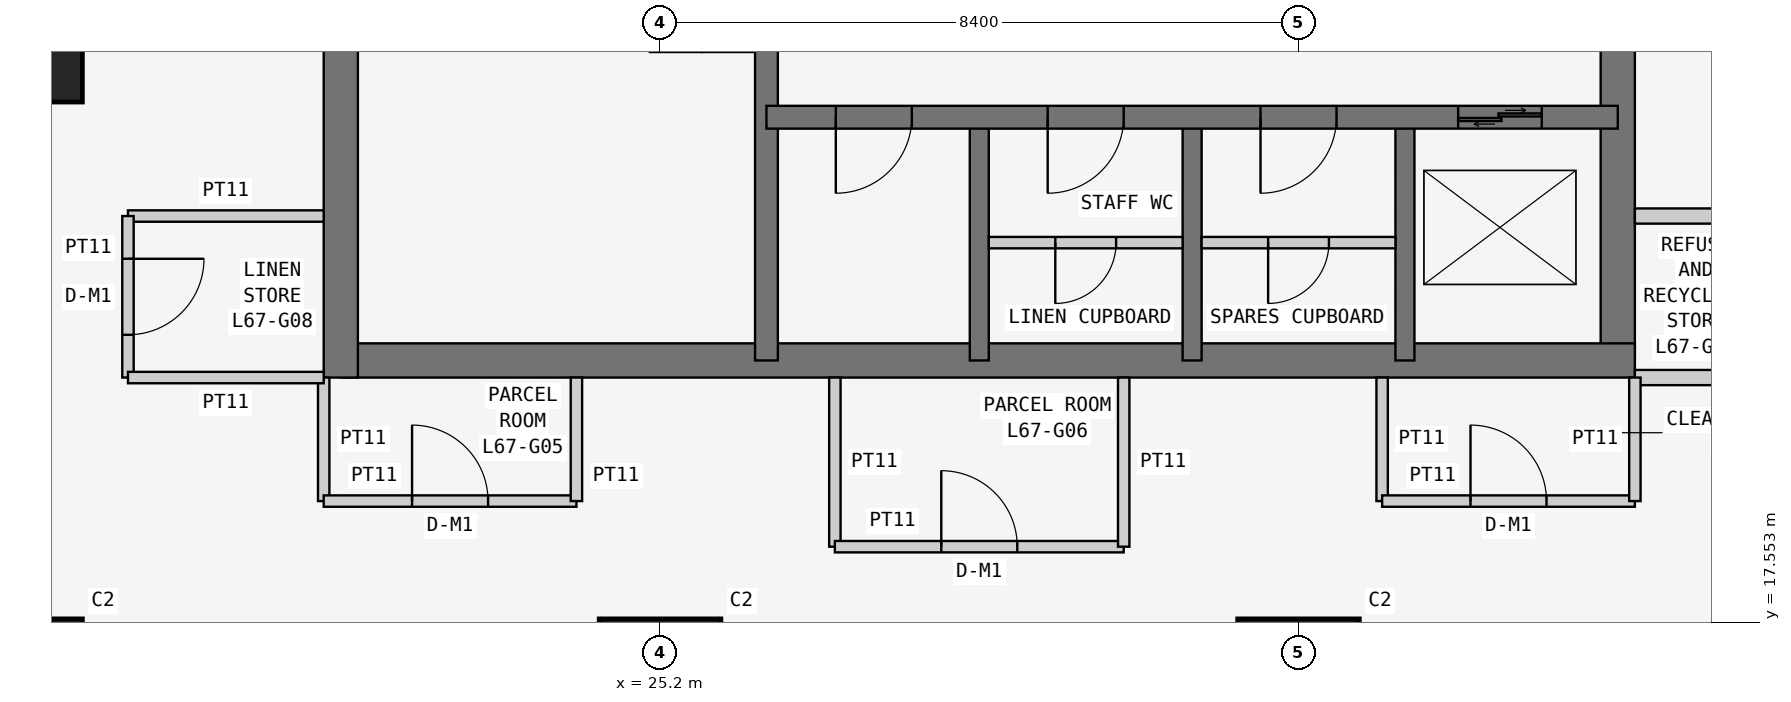
"""IFC4 building model, lengths in metres.
Left out: names, types, materials, properties, quantities, classifications, styles, units other than length and angle.
Written with IfcOpenShell. Run it as: python <this file> out.ifc"""

import sys

from ifc_helpers import new_model, si_unit, direction, frame, frame_2d, origin, origin_2d, place, context, subcontext, project, spatial, rectangle, extrude, element, fill, save


model = new_model("IFC4")
c1 = context("Model", 3, precision=1e-05, world=origin(), true_north=direction((0.0, 1.0)))
c2 = subcontext(c1, "Body", "Model", "MODEL_VIEW")
j1 = project(units=[si_unit("LENGTHUNIT", "METRE"), si_unit("PLANEANGLEUNIT", "RADIAN")], contexts=[c1])
p1 = place(None, origin())
s1 = spatial("IfcSite", under=j1, at=p1, CompositionType="ELEMENT")
p2 = place(p1, origin())
s2 = spatial("IfcBuilding", under=s1, at=p2, CompositionType="ELEMENT")
p3 = place(p2, frame((0.0, 0.0, 257.7)))
s3 = spatial("IfcBuildingStorey", under=s2, at=p3, CompositionType="ELEMENT", Elevation=257.7)
for number, where, z_axis, x_axis in (
    (1, (16.8, 16.8, 0.0), (0.0, 0.0, 1.0), (1.0, 0.0, 0.0)),
    (2, (16.8, 25.2, 0.0), (0.0, 0.0, 1.0), (1.0, 0.0, 0.0)),
    (3, (25.2, 16.8, 0.0), (0.0, 0.0, 1.0), (1.0, 0.0, 0.0)),
    (4, (33.6, 16.8, 0.0), (0.0, 0.0, 1.0), (1.0, 0.0, 0.0)),
):
    element("IfcColumn", number, at=place(p3, frame(where, z_axis=z_axis, x_axis=x_axis)), inside=s3, PredefinedType="COLUMN", context=c2, shape_type="SweptSolid", body=[
        extrude(rectangle(XDim=1.6, YDim=1.6, at=origin_2d()), origin(), (0.0, 0.0, 1.0), 3.6),
    ])
p4 = place(p3, frame((21.0, 21.0, 0.0), z_axis=(0.0, 0.0, 1.0), x_axis=(1.0, 0.0, 0.0)))
e5 = element("IfcWall", 5, at=p4, inside=s3, PredefinedType="SHEAR", context=c2, shape_type="SweptSolid", body=[
    extrude(rectangle(XDim=17.025, YDim=0.45, at=frame_2d((8.512, 0.0))), origin(), (0.0, 0.0, 1.0), 3.6),
])
p5 = place(p3, frame((37.8, 21.0, 0.0), z_axis=(0.0, 0.0, 1.0), x_axis=(0.0, 1.0, 0.0)))
e6 = element("IfcWall", 6, at=p5, inside=s3, PredefinedType="SHEAR", context=c2, shape_type="SweptSolid", body=[
    extrude(rectangle(XDim=17.025, YDim=0.45, at=frame_2d((8.512, 0.0))), origin(), (0.0, 0.0, 1.0), 3.6),
])
p6 = place(p5, frame((5.2, 0.0, 0.0)))
e7 = element("IfcOpeningElement", 7, at=p6, cuts=e6, PredefinedType="OPENING", context=c2, shape_type="SweptSolid", body=[
    extrude(rectangle(XDim=1.2, YDim=2.1, at=frame_2d((0.6, 1.05))), frame((0.0, 0.235, 0.0), z_axis=(0.0, -1.0, 0.0), x_axis=(1.0, 0.0, 0.0)), (0.0, 0.0, 1.0), 0.47),
])
p7 = place(p3, frame((21.0, 37.8, 0.0), z_axis=(0.0, 0.0, 1.0), x_axis=(0.0, -1.0, 0.0)))
e8 = element("IfcWall", 8, at=p7, inside=s3, PredefinedType="SHEAR", context=c2, shape_type="SweptSolid", body=[
    extrude(rectangle(XDim=17.025, YDim=0.45, at=frame_2d((8.513, 0.0))), origin(), (0.0, 0.0, 1.0), 3.6),
])
p8 = place(p7, frame((5.4, 0.0, 0.0)))
e9 = element("IfcOpeningElement", 9, at=p8, cuts=e8, PredefinedType="OPENING", context=c2, shape_type="SweptSolid", body=[
    extrude(rectangle(XDim=1.2, YDim=2.1, at=frame_2d((0.6, 1.05))), frame((0.0, 0.235, 0.0), z_axis=(0.0, -1.0, 0.0), x_axis=(1.0, 0.0, 0.0)), (0.0, 0.0, 1.0), 0.47),
])
p9 = place(p3, frame((26.6, 21.0, 0.0), z_axis=(0.0, 0.0, 1.0), x_axis=(0.0, 1.0, 0.0)))
e10 = element("IfcWall", 10, at=p9, inside=s3, PredefinedType="SHEAR", context=c2, shape_type="SweptSolid", body=[
    extrude(rectangle(XDim=16.8, YDim=0.3, at=frame_2d((8.4, 0.0))), origin(), (0.0, 0.0, 1.0), 3.6),
])
p10 = place(p9, frame((10.4, 0.0, 0.0)))
e11 = element("IfcOpeningElement", 11, at=p10, cuts=e10, PredefinedType="OPENING", context=c2, shape_type="SweptSolid", body=[
    extrude(rectangle(XDim=1.2, YDim=2.1, at=frame_2d((0.6, 1.05))), frame((0.0, 0.16, 0.0), z_axis=(0.0, -1.0, 0.0), x_axis=(1.0, 0.0, 0.0)), (0.0, 0.0, 1.0), 0.32),
])
p11 = place(p3, frame((26.6, 24.2, 0.0), z_axis=(0.0, 0.0, 1.0), x_axis=(1.0, 0.0, 0.0)))
e12 = element("IfcWall", 12, at=p11, inside=s3, PredefinedType="SHEAR", context=c2, shape_type="SweptSolid", body=[
    extrude(rectangle(XDim=11.2, YDim=0.3, at=frame_2d((5.6, 0.0))), origin(), (0.0, 0.0, 1.0), 3.6),
])
p12 = place(p11, frame((0.913, 0.0, 0.0)))
e13 = element("IfcOpeningElement", 13, at=p12, cuts=e12, PredefinedType="OPENING", context=c2, shape_type="SweptSolid", body=[
    extrude(rectangle(XDim=1.0, YDim=2.1, at=frame_2d((0.5, 1.05))), frame((0.0, 0.16, 0.0), z_axis=(0.0, -1.0, 0.0), x_axis=(1.0, 0.0, 0.0)), (0.0, 0.0, 1.0), 0.32),
])
p13 = place(p11, frame((3.7, 0.0, 0.0)))
e14 = element("IfcOpeningElement", 14, at=p13, cuts=e12, PredefinedType="OPENING", context=c2, shape_type="SweptSolid", body=[
    extrude(rectangle(XDim=1.0, YDim=2.1, at=frame_2d((0.5, 1.05))), frame((0.0, 0.16, 0.0), z_axis=(0.0, -1.0, 0.0), x_axis=(1.0, 0.0, 0.0)), (0.0, 0.0, 1.0), 0.32),
])
p14 = place(p11, frame((6.5, 0.0, 0.0)))
e15 = element("IfcOpeningElement", 15, at=p14, cuts=e12, PredefinedType="OPENING", context=c2, shape_type="SweptSolid", body=[
    extrude(rectangle(XDim=1.0, YDim=2.1, at=frame_2d((0.5, 1.05))), frame((0.0, 0.16, 0.0), z_axis=(0.0, -1.0, 0.0), x_axis=(1.0, 0.0, 0.0)), (0.0, 0.0, 1.0), 0.32),
])
p15 = place(p11, frame((9.1, 0.0, 0.0)))
e16 = element("IfcOpeningElement", 16, at=p15, cuts=e12, PredefinedType="OPENING", context=c2, shape_type="SweptSolid", body=[
    extrude(rectangle(XDim=1.1, YDim=2.1, at=frame_2d((0.55, 1.05))), frame((0.0, 0.16, 0.0), z_axis=(0.0, -1.0, 0.0), x_axis=(1.0, 0.0, 0.0)), (0.0, 0.0, 1.0), 0.32),
])
for number, where, z_axis, x_axis in (
    (17, (29.4, 21.0, 0.0), (0.0, 0.0, 1.0), (0.0, 1.0, 0.0)),
    (18, (32.2, 21.0, 0.0), (0.0, 0.0, 1.0), (0.0, 1.0, 0.0)),
    (19, (35.0, 21.0, 0.0), (0.0, 0.0, 1.0), (0.0, 1.0, 0.0)),
):
    element("IfcWall", number, at=place(p3, frame(where, z_axis=z_axis, x_axis=x_axis)), inside=s3, PredefinedType="SHEAR", context=c2, shape_type="SweptSolid", body=[
        extrude(rectangle(XDim=3.2, YDim=0.25, at=frame_2d((1.6, 0.0))), origin(), (0.0, 0.0, 1.0), 3.6),
    ])
for number, where, z_axis, x_axis in (
    (20, (38.025, 20.775, 0.0), (0.0, 0.0, 1.0), (1.0, 0.0, 0.0)),
    (21, (40.6, 22.9, 0.0), (0.0, 0.0, 1.0), (-1.0, 0.0, 0.0)),
):
    element("IfcWall", number, at=place(p3, frame(where, z_axis=z_axis, x_axis=x_axis)), inside=s3, PredefinedType="PARTITIONING", context=c2, shape_type="SweptSolid", body=[
        extrude(rectangle(XDim=2.575, YDim=0.2, at=frame_2d((1.288, 0.0))), origin(), (0.0, 0.0, 1.0), 3.45),
    ])
p16 = place(p3, frame((20.775, 20.775, 0.0), z_axis=(0.0, 0.0, 1.0), x_axis=(0.0, -1.0, 0.0)))
e22 = element("IfcWall", 22, at=p16, inside=s3, PredefinedType="PARTITIONING", context=c2, shape_type="SweptSolid", body=[
    extrude(rectangle(XDim=1.625, YDim=0.15, at=frame_2d((0.812, 0.0))), origin(), (0.0, 0.0, 1.0), 3.45),
])
p17 = place(p3, frame((20.775, 19.15, 0.0), z_axis=(0.0, 0.0, 1.0), x_axis=(1.0, 0.0, 0.0)))
e23 = element("IfcWall", 23, at=p17, inside=s3, PredefinedType="PARTITIONING", context=c2, shape_type="SweptSolid", body=[
    extrude(rectangle(XDim=3.325, YDim=0.15, at=frame_2d((1.663, 0.0))), origin(), (0.0, 0.0, 1.0), 3.45),
])
p18 = place(p17, frame((1.163, 0.0, 0.0)))
e24 = element("IfcOpeningElement", 24, at=p18, cuts=e23, PredefinedType="OPENING", context=c2, shape_type="SweptSolid", body=[
    extrude(rectangle(XDim=1.0, YDim=2.1, at=frame_2d((0.5, 1.05))), frame((0.0, 0.085, 0.0), z_axis=(0.0, -1.0, 0.0), x_axis=(1.0, 0.0, 0.0)), (0.0, 0.0, 1.0), 0.17),
])
p19 = place(p3, frame((24.1, 19.15, 0.0), z_axis=(0.0, 0.0, 1.0), x_axis=(0.0, 1.0, 0.0)))
e25 = element("IfcWall", 25, at=p19, inside=s3, PredefinedType="PARTITIONING", context=c2, shape_type="SweptSolid", body=[
    extrude(rectangle(XDim=1.625, YDim=0.15, at=frame_2d((0.812, 0.0))), origin(), (0.0, 0.0, 1.0), 3.45),
])
p20 = place(p3, frame((27.5, 20.775, 0.0), z_axis=(0.0, 0.0, 1.0), x_axis=(0.0, -1.0, 0.0)))
e26 = element("IfcWall", 26, at=p20, inside=s3, PredefinedType="PARTITIONING", context=c2, shape_type="SweptSolid", body=[
    extrude(rectangle(XDim=2.225, YDim=0.15, at=frame_2d((1.112, 0.0))), origin(), (0.0, 0.0, 1.0), 3.45),
])
p21 = place(p3, frame((27.5, 18.55, 0.0), z_axis=(0.0, 0.0, 1.0), x_axis=(1.0, 0.0, 0.0)))
e27 = element("IfcWall", 27, at=p21, inside=s3, PredefinedType="PARTITIONING", context=c2, shape_type="SweptSolid", body=[
    extrude(rectangle(XDim=3.8, YDim=0.15, at=frame_2d((1.9, 0.0))), origin(), (0.0, 0.0, 1.0), 3.45),
])
p22 = place(p21, frame((1.4, 0.0, 0.0)))
e28 = element("IfcOpeningElement", 28, at=p22, cuts=e27, PredefinedType="OPENING", context=c2, shape_type="SweptSolid", body=[
    extrude(rectangle(XDim=1.0, YDim=2.1, at=frame_2d((0.5, 1.05))), frame((0.0, 0.085, 0.0), z_axis=(0.0, -1.0, 0.0), x_axis=(1.0, 0.0, 0.0)), (0.0, 0.0, 1.0), 0.17),
])
p23 = place(p3, frame((31.3, 18.55, 0.0), z_axis=(0.0, 0.0, 1.0), x_axis=(0.0, 1.0, 0.0)))
e29 = element("IfcWall", 29, at=p23, inside=s3, PredefinedType="PARTITIONING", context=c2, shape_type="SweptSolid", body=[
    extrude(rectangle(XDim=2.225, YDim=0.15, at=frame_2d((1.112, 0.0))), origin(), (0.0, 0.0, 1.0), 3.45),
])
p24 = place(p3, frame((34.7, 20.775, 0.0), z_axis=(0.0, 0.0, 1.0), x_axis=(0.0, -1.0, 0.0)))
e30 = element("IfcWall", 30, at=p24, inside=s3, PredefinedType="PARTITIONING", context=c2, shape_type="SweptSolid", body=[
    extrude(rectangle(XDim=1.625, YDim=0.15, at=frame_2d((0.812, 0.0))), origin(), (0.0, 0.0, 1.0), 3.45),
])
p25 = place(p3, frame((34.7, 19.15, 0.0), z_axis=(0.0, 0.0, 1.0), x_axis=(1.0, 0.0, 0.0)))
e31 = element("IfcWall", 31, at=p25, inside=s3, PredefinedType="PARTITIONING", context=c2, shape_type="SweptSolid", body=[
    extrude(rectangle(XDim=3.325, YDim=0.15, at=frame_2d((1.663, 0.0))), origin(), (0.0, 0.0, 1.0), 3.45),
])
p26 = place(p25, frame((1.163, 0.0, 0.0)))
e32 = element("IfcOpeningElement", 32, at=p26, cuts=e31, PredefinedType="OPENING", context=c2, shape_type="SweptSolid", body=[
    extrude(rectangle(XDim=1.0, YDim=2.1, at=frame_2d((0.5, 1.05))), frame((0.0, 0.085, 0.0), z_axis=(0.0, -1.0, 0.0), x_axis=(1.0, 0.0, 0.0)), (0.0, 0.0, 1.0), 0.17),
])
p27 = place(p3, frame((38.025, 19.15, 0.0), z_axis=(0.0, 0.0, 1.0), x_axis=(0.0, 1.0, 0.0)))
e33 = element("IfcWall", 33, at=p27, inside=s3, PredefinedType="PARTITIONING", context=c2, shape_type="SweptSolid", body=[
    extrude(rectangle(XDim=1.625, YDim=0.15, at=frame_2d((0.812, 0.0))), origin(), (0.0, 0.0, 1.0), 3.45),
])
p28 = place(p3, frame((20.775, 22.9, 0.0), z_axis=(0.0, 0.0, 1.0), x_axis=(-1.0, 0.0, 0.0)))
e34 = element("IfcWall", 34, at=p28, inside=s3, PredefinedType="PARTITIONING", context=c2, shape_type="SweptSolid", body=[
    extrude(rectangle(XDim=2.575, YDim=0.15, at=frame_2d((1.288, 0.0))), origin(), (0.0, 0.0, 1.0), 3.45),
])
p29 = place(p3, frame((18.2, 22.9, 0.0), z_axis=(0.0, 0.0, 1.0), x_axis=(0.0, -1.0, 0.0)))
e35 = element("IfcWall", 35, at=p29, inside=s3, PredefinedType="PARTITIONING", context=c2, shape_type="SweptSolid", body=[
    extrude(rectangle(XDim=2.125, YDim=0.15, at=frame_2d((1.062, 0.0))), origin(), (0.0, 0.0, 1.0), 3.45),
])
p30 = place(p29, frame((0.562, 0.0, 0.0)))
e36 = element("IfcOpeningElement", 36, at=p30, cuts=e35, PredefinedType="OPENING", context=c2, shape_type="SweptSolid", body=[
    extrude(rectangle(XDim=1.0, YDim=2.1, at=frame_2d((0.5, 1.05))), frame((0.0, 0.085, 0.0), z_axis=(0.0, -1.0, 0.0), x_axis=(1.0, 0.0, 0.0)), (0.0, 0.0, 1.0), 0.17),
])
p31 = place(p3, frame((18.2, 20.775, 0.0), z_axis=(0.0, 0.0, 1.0), x_axis=(1.0, 0.0, 0.0)))
e37 = element("IfcWall", 37, at=p31, inside=s3, PredefinedType="PARTITIONING", context=c2, shape_type="SweptSolid", body=[
    extrude(rectangle(XDim=2.575, YDim=0.15, at=frame_2d((1.288, 0.0))), origin(), (0.0, 0.0, 1.0), 3.45),
])
p32 = place(p3, frame((29.525, 22.55, 0.0), z_axis=(0.0, 0.0, 1.0), x_axis=(1.0, 0.0, 0.0)))
e38 = element("IfcWall", 38, at=p32, inside=s3, PredefinedType="PARTITIONING", context=c2, shape_type="SweptSolid", body=[
    extrude(rectangle(XDim=2.55, YDim=0.15, at=frame_2d((1.275, 0.0))), origin(), (0.0, 0.0, 1.0), 3.45),
])
p33 = place(p32, frame((0.875, 0.0, 0.0)))
e39 = element("IfcOpeningElement", 39, at=p33, cuts=e38, PredefinedType="OPENING", context=c2, shape_type="SweptSolid", body=[
    extrude(rectangle(XDim=0.8, YDim=2.1, at=frame_2d((0.4, 1.05))), frame((0.0, 0.085, 0.0), z_axis=(0.0, -1.0, 0.0), x_axis=(1.0, 0.0, 0.0)), (0.0, 0.0, 1.0), 0.17),
])
p34 = place(p3, frame((32.325, 22.55, 0.0), z_axis=(0.0, 0.0, 1.0), x_axis=(1.0, 0.0, 0.0)))
e40 = element("IfcWall", 40, at=p34, inside=s3, PredefinedType="PARTITIONING", context=c2, shape_type="SweptSolid", body=[
    extrude(rectangle(XDim=2.55, YDim=0.15, at=frame_2d((1.275, 0.0))), origin(), (0.0, 0.0, 1.0), 3.45),
])
p35 = place(p34, frame((0.875, 0.0, 0.0)))
e41 = element("IfcOpeningElement", 41, at=p35, cuts=e40, PredefinedType="OPENING", context=c2, shape_type="SweptSolid", body=[
    extrude(rectangle(XDim=0.8, YDim=2.1, at=frame_2d((0.4, 1.05))), frame((0.0, 0.085, 0.0), z_axis=(0.0, -1.0, 0.0), x_axis=(1.0, 0.0, 0.0)), (0.0, 0.0, 1.0), 0.17),
])
p36 = place(p18, origin())
e42 = element("IfcDoor", 42, at=p36, inside=s3, OperationType="SINGLE_SWING_LEFT", PredefinedType="DOOR", context=c2, shape_type="SweptSolid", body=[
    extrude(rectangle(XDim=1.0, YDim=2.1, at=frame_2d((0.5, 1.05))), frame((0.0, 0.025, 0.0), z_axis=(0.0, -1.0, 0.0), x_axis=(1.0, 0.0, 0.0)), (0.0, 0.0, 1.0), 0.05),
])
fill(e24, e42)
p37 = place(p22, origin())
e43 = element("IfcDoor", 43, at=p37, inside=s3, OperationType="SINGLE_SWING_LEFT", PredefinedType="DOOR", context=c2, shape_type="SweptSolid", body=[
    extrude(rectangle(XDim=1.0, YDim=2.1, at=frame_2d((0.5, 1.05))), frame((0.0, 0.025, 0.0), z_axis=(0.0, -1.0, 0.0), x_axis=(1.0, 0.0, 0.0)), (0.0, 0.0, 1.0), 0.05),
])
fill(e28, e43)
p38 = place(p26, origin())
e44 = element("IfcDoor", 44, at=p38, inside=s3, OperationType="SINGLE_SWING_LEFT", PredefinedType="DOOR", context=c2, shape_type="SweptSolid", body=[
    extrude(rectangle(XDim=1.0, YDim=2.1, at=frame_2d((0.5, 1.05))), frame((0.0, 0.025, 0.0), z_axis=(0.0, -1.0, 0.0), x_axis=(1.0, 0.0, 0.0)), (0.0, 0.0, 1.0), 0.05),
])
fill(e32, e44)
p39 = place(p30, origin())
e45 = element("IfcDoor", 45, at=p39, inside=s3, OperationType="SINGLE_SWING_LEFT", PredefinedType="DOOR", context=c2, shape_type="SweptSolid", body=[
    extrude(rectangle(XDim=1.0, YDim=2.1, at=frame_2d((0.5, 1.05))), frame((0.0, 0.025, 0.0), z_axis=(0.0, -1.0, 0.0), x_axis=(1.0, 0.0, 0.0)), (0.0, 0.0, 1.0), 0.05),
])
fill(e36, e45)
p40 = place(p12, frame((1.0, 0.0, 0.0), z_axis=(0.0, 0.0, 1.0), x_axis=(-1.0, 0.0, 0.0)))
e46 = element("IfcDoor", 46, at=p40, inside=s3, OperationType="SINGLE_SWING_RIGHT", PredefinedType="DOOR", context=c2, shape_type="SweptSolid", body=[
    extrude(rectangle(XDim=1.0, YDim=2.1, at=frame_2d((0.5, 1.05))), frame((0.0, 0.025, 0.0), z_axis=(0.0, -1.0, 0.0), x_axis=(1.0, 0.0, 0.0)), (0.0, 0.0, 1.0), 0.05),
])
fill(e13, e46)
p41 = place(p13, frame((1.0, 0.0, 0.0), z_axis=(0.0, 0.0, 1.0), x_axis=(-1.0, 0.0, 0.0)))
e47 = element("IfcDoor", 47, at=p41, inside=s3, OperationType="SINGLE_SWING_RIGHT", PredefinedType="DOOR", context=c2, shape_type="SweptSolid", body=[
    extrude(rectangle(XDim=1.0, YDim=2.1, at=frame_2d((0.5, 1.05))), frame((0.0, 0.025, 0.0), z_axis=(0.0, -1.0, 0.0), x_axis=(1.0, 0.0, 0.0)), (0.0, 0.0, 1.0), 0.05),
])
fill(e14, e47)
p42 = place(p33, frame((0.8, 0.0, 0.0), z_axis=(0.0, 0.0, 1.0), x_axis=(-1.0, 0.0, 0.0)))
e48 = element("IfcDoor", 48, at=p42, inside=s3, OperationType="SINGLE_SWING_RIGHT", PredefinedType="DOOR", context=c2, shape_type="SweptSolid", body=[
    extrude(rectangle(XDim=0.8, YDim=2.1, at=frame_2d((0.4, 1.05))), frame((0.0, 0.025, 0.0), z_axis=(0.0, -1.0, 0.0), x_axis=(1.0, 0.0, 0.0)), (0.0, 0.0, 1.0), 0.05),
])
fill(e39, e48)
p43 = place(p14, frame((1.0, 0.0, 0.0), z_axis=(0.0, 0.0, 1.0), x_axis=(-1.0, 0.0, 0.0)))
e49 = element("IfcDoor", 49, at=p43, inside=s3, OperationType="SINGLE_SWING_RIGHT", PredefinedType="DOOR", context=c2, shape_type="SweptSolid", body=[
    extrude(rectangle(XDim=1.0, YDim=2.1, at=frame_2d((0.5, 1.05))), frame((0.0, 0.025, 0.0), z_axis=(0.0, -1.0, 0.0), x_axis=(1.0, 0.0, 0.0)), (0.0, 0.0, 1.0), 0.05),
])
fill(e15, e49)
p44 = place(p35, frame((0.8, 0.0, 0.0), z_axis=(0.0, 0.0, 1.0), x_axis=(-1.0, 0.0, 0.0)))
e50 = element("IfcDoor", 50, at=p44, inside=s3, OperationType="SINGLE_SWING_RIGHT", PredefinedType="DOOR", context=c2, shape_type="SweptSolid", body=[
    extrude(rectangle(XDim=0.8, YDim=2.1, at=frame_2d((0.4, 1.05))), frame((0.0, 0.025, 0.0), z_axis=(0.0, -1.0, 0.0), x_axis=(1.0, 0.0, 0.0)), (0.0, 0.0, 1.0), 0.05),
])
fill(e41, e50)
p45 = place(p15, origin())
e51 = element("IfcDoor", 51, at=p45, inside=s3, OperationType="DOUBLE_DOOR_SLIDING", PredefinedType="DOOR", context=c2, shape_type="SweptSolid", body=[
    extrude(rectangle(XDim=1.1, YDim=2.1, at=frame_2d((0.55, 1.05))), frame((0.0, 0.025, 0.0), z_axis=(0.0, -1.0, 0.0), x_axis=(1.0, 0.0, 0.0)), (0.0, 0.0, 1.0), 0.05),
])
fill(e16, e51)
save(model, sys.argv[1])
